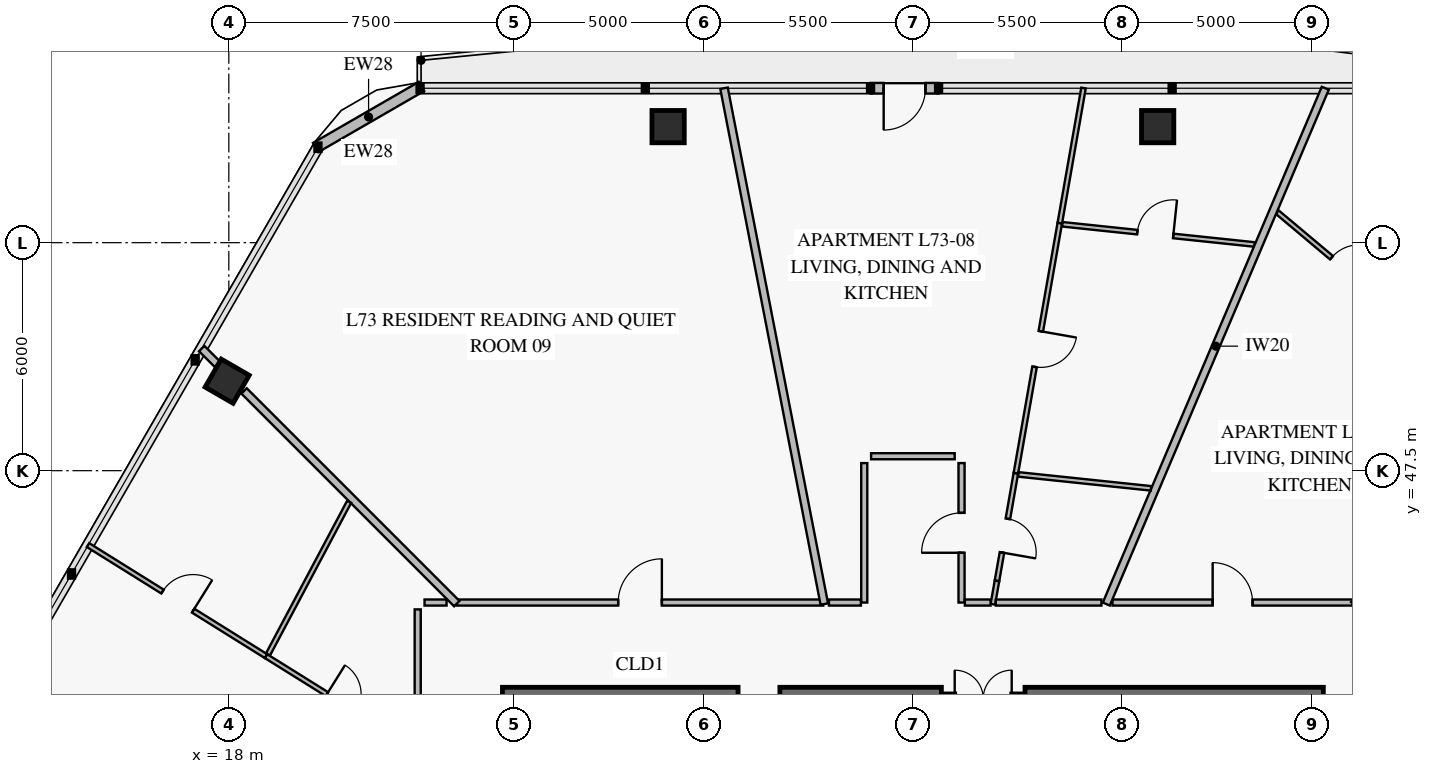
"""IFC4 building model, lengths in metres.
Left out: names, types, materials, properties, quantities, classifications, styles, units other than length and angle.
Written with IfcOpenShell. Run it as: python <this file> out.ifc"""

import sys

from ifc_helpers import new_model, si_unit, direction, frame, frame_2d, origin, origin_2d, place, context, subcontext, project, spatial, rectangle, extrude, element, fill, save


model = new_model("IFC4")
c1 = context("Model", 3, precision=1e-05, world=origin(), true_north=direction((0.0, 1.0)))
c2 = subcontext(c1, "Body", "Model", "MODEL_VIEW")
j1 = project(units=[si_unit("LENGTHUNIT", "METRE"), si_unit("PLANEANGLEUNIT", "RADIAN")], contexts=[c1])
p1 = place(None, origin())
s1 = spatial("IfcSite", under=j1, at=p1, CompositionType="ELEMENT")
p2 = place(p1, origin())
s2 = spatial("IfcBuilding", under=s1, at=p2, CompositionType="ELEMENT")
p3 = place(p2, frame((0.0, 0.0, 288.2)))
s3 = spatial("IfcBuildingStorey", under=s2, at=p3, CompositionType="ELEMENT", Elevation=288.2)
p4 = place(p3, frame((46.8, 41.5, 0.0), z_axis=(0.0, 0.0, 1.0), x_axis=(-1.0, 0.0, 0.0)))
e1 = element("IfcWall", 1, at=p4, inside=s3, PredefinedType="SHEAR", context=c2, shape_type="SweptSolid", body=[
    extrude(rectangle(XDim=7.85, YDim=0.6, at=frame_2d((3.925, 0.0))), origin(), (0.0, 0.0, 1.0), 3.8),
])
p5 = place(p3, frame((36.75, 41.5, 0.0), z_axis=(0.0, 0.0, 1.0), x_axis=(-1.0, 0.0, 0.0)))
e2 = element("IfcWall", 2, at=p5, inside=s3, PredefinedType="SHEAR", context=c2, shape_type="SweptSolid", body=[
    extrude(rectangle(XDim=11.55, YDim=0.6, at=frame_2d((5.775, 0.0))), origin(), (0.0, 0.0, 1.0), 3.8),
])
p6 = place(p5, frame((4.25, 0.0, 0.0)))
e3 = element("IfcOpeningElement", 3, at=p6, cuts=e2, PredefinedType="OPENING", context=c2, shape_type="SweptSolid", body=[
    extrude(rectangle(XDim=1.1, YDim=2.15, at=frame_2d((0.55, 1.075))), frame((0.0, 0.312, 0.0), z_axis=(0.0, -1.0, 0.0), x_axis=(1.0, 0.0, 0.0)), (0.0, 0.0, 1.0), 0.624),
])
for number, where, z_axis, x_axis in (
    (4, (42.441, 56.554, 0.0), (0.0, 0.0, 1.0), (-1.0, 0.0, 0.0)),
    (5, (29.559, 56.554, 0.0), (0.0, 0.0, 1.0), (-1.0, 0.0, 0.0)),
    (6, (17.956, 49.855, 0.0), (0.0, 0.0, 1.0), (-0.5, -0.866, 0.0)),
):
    element("IfcColumn", number, at=place(p3, frame(where, z_axis=z_axis, x_axis=x_axis)), inside=s3, PredefinedType="COLUMN", context=c2, shape_type="SweptSolid", body=[
        extrude(rectangle(XDim=0.85, YDim=0.85, at=origin_2d()), origin(), (0.0, 0.0, 1.0), 3.55),
    ])
p7 = place(p3, frame((20.285, 56.004, 0.0), z_axis=(0.0, 0.0, 1.0), x_axis=(0.866028773314, 0.499994163758, 0.0)))
e7 = element("IfcWall", 7, at=p7, inside=s3, PredefinedType="SOLIDWALL", context=c2, shape_type="SweptSolid", body=[
    extrude(rectangle(XDim=3.215, YDim=0.28, at=frame_2d((1.607, 0.0))), origin(), (0.0, 0.0, 1.0), 3.55),
])
p8 = place(p3, frame((34.886, 57.564, 0.0), z_axis=(0.0, 0.0, 1.0), x_axis=(1.0, 0.0, 0.0)))
e8 = element("IfcWall", 8, at=p8, inside=s3, PredefinedType="SOLIDWALL", context=c2, shape_type="SweptSolid", body=[
    extrude(rectangle(XDim=1.79, YDim=0.28, at=frame_2d((0.895, 0.0))), origin(), (0.0, 0.0, 1.0), 3.55),
])
p9 = place(p8, frame((0.345, 0.0, 0.0)))
e9 = element("IfcOpeningElement", 9, at=p9, cuts=e8, PredefinedType="OPENING", context=c2, shape_type="SweptSolid", body=[
    extrude(rectangle(XDim=1.1, YDim=2.2, at=frame_2d((0.55, 1.1))), frame((0.0, 0.152, 0.0), z_axis=(0.0, -1.0, 0.0), x_axis=(1.0, 0.0, 0.0)), (0.0, 0.0, 1.0), 0.304),
])
p10 = place(p3, frame((52.253, 48.71, 0.0), z_axis=(0.0, 0.0, 1.0), x_axis=(-0.766038651281, 0.642794512067, 0.0)))
e10 = element("IfcWall", 10, at=p10, inside=s3, PredefinedType="PARTITIONING", context=c2, shape_type="SweptSolid", body=[
    extrude(rectangle(XDim=8.7, YDim=0.12, at=frame_2d((4.35, 0.0))), origin(), (0.0, 0.0, 1.0), 3.55),
])
p11 = place(p10, frame((1.778, 0.0, 0.0)))
e11 = element("IfcOpeningElement", 11, at=p11, cuts=e10, PredefinedType="OPENING", context=c2, shape_type="SweptSolid", body=[
    extrude(rectangle(XDim=0.95, YDim=2.1, at=frame_2d((0.475, 1.05))), frame((0.0, 0.072, 0.0), z_axis=(0.0, -1.0, 0.0), x_axis=(1.0, 0.0, 0.0)), (0.0, 0.0, 1.0), 0.144),
])
p12 = place(p10, frame((5.887, 0.0, 0.0)))
e12 = element("IfcOpeningElement", 12, at=p12, cuts=e10, PredefinedType="OPENING", context=c2, shape_type="SweptSolid", body=[
    extrude(rectangle(XDim=0.95, YDim=2.1, at=frame_2d((0.475, 1.05))), frame((0.0, 0.072, 0.0), z_axis=(0.0, -1.0, 0.0), x_axis=(1.0, 0.0, 0.0)), (0.0, 0.0, 1.0), 0.144),
])
p13 = place(p3, frame((47.573, 44.03, 0.0), z_axis=(0.0, 0.0, 1.0), x_axis=(-1.0, 0.0, 0.0)))
e13 = element("IfcWall", 13, at=p13, inside=s3, PredefinedType="PARTITIONING", context=c2, shape_type="SweptSolid", body=[
    extrude(rectangle(XDim=6.321, YDim=0.16, at=frame_2d((3.16, 0.0))), origin(), (0.0, 0.0, 1.0), 3.55),
])
p14 = place(p13, frame((2.635, 0.0, 0.0)))
e14 = element("IfcOpeningElement", 14, at=p14, cuts=e13, PredefinedType="OPENING", context=c2, shape_type="SweptSolid", body=[
    extrude(rectangle(XDim=1.05, YDim=2.15, at=frame_2d((0.525, 1.075))), frame((0.0, 0.092, 0.0), z_axis=(0.0, -1.0, 0.0), x_axis=(1.0, 0.0, 0.0)), (0.0, 0.0, 1.0), 0.184),
])
p15 = place(p3, frame((38.213, 44.6, 0.0), z_axis=(0.0, 0.0, 1.0), x_axis=(0.172952580591, 0.984930152278, 0.0)))
e15 = element("IfcWall", 15, at=p15, inside=s3, PredefinedType="PARTITIONING", context=c2, shape_type="SweptSolid", body=[
    extrude(rectangle(XDim=2.877, YDim=0.12, at=frame_2d((1.438, 0.0))), origin(), (0.0, 0.0, 1.0), 3.55),
])
p16 = place(p15, frame((0.758, 0.0, 0.0)))
e16 = element("IfcOpeningElement", 16, at=p16, cuts=e15, PredefinedType="OPENING", context=c2, shape_type="SweptSolid", body=[
    extrude(rectangle(XDim=0.9, YDim=2.1, at=frame_2d((0.45, 1.05))), frame((0.0, 0.072, 0.0), z_axis=(0.0, -1.0, 0.0), x_axis=(1.0, 0.0, 0.0)), (0.0, 0.0, 1.0), 0.144),
])
p17 = place(p3, frame((38.71, 47.434, 0.0), z_axis=(0.0, 0.0, 1.0), x_axis=(0.172976678648, 0.984925920384, 0.0)))
e17 = element("IfcWall", 17, at=p17, inside=s3, PredefinedType="PARTITIONING", context=c2, shape_type="SweptSolid", body=[
    extrude(rectangle(XDim=6.683, YDim=0.12, at=frame_2d((3.342, 0.0))), origin(), (0.0, 0.0, 1.0), 3.15),
])
p18 = place(p17, frame((2.841, 0.0, 0.0)))
e18 = element("IfcOpeningElement", 18, at=p18, cuts=e17, PredefinedType="OPENING", context=c2, shape_type="SweptSolid", body=[
    extrude(rectangle(XDim=0.95, YDim=2.1, at=frame_2d((0.475, 1.05))), frame((0.0, 0.072, 0.0), z_axis=(0.0, -1.0, 0.0), x_axis=(1.0, 0.0, 0.0)), (0.0, 0.0, 1.0), 0.144),
])
p19 = place(p3, frame((44.994, 53.452, 0.0), z_axis=(0.0, 0.0, 1.0), x_axis=(-0.994522778287, 0.104520062511, 0.0)))
e19 = element("IfcWall", 19, at=p19, inside=s3, PredefinedType="PARTITIONING", context=c2, shape_type="SweptSolid", body=[
    extrude(rectangle(XDim=5.092, YDim=0.12, at=frame_2d((2.546, 0.0))), origin(), (0.0, 0.0, 1.0), 2.95),
])
p20 = place(p19, frame((2.155, 0.0, 0.0)))
e20 = element("IfcOpeningElement", 20, at=p20, cuts=e19, PredefinedType="OPENING", context=c2, shape_type="SweptSolid", body=[
    extrude(rectangle(XDim=0.95, YDim=2.1, at=frame_2d((0.475, 1.05))), frame((0.0, 0.072, 0.0), z_axis=(0.0, -1.0, 0.0), x_axis=(1.0, 0.0, 0.0)), (0.0, 0.0, 1.0), 0.144),
])
p21 = place(p3, frame((37.28, 44.03, 0.0), z_axis=(0.0, 0.0, 1.0), x_axis=(0.0, 1.0, 0.0)))
e21 = element("IfcWall", 21, at=p21, inside=s3, PredefinedType="PARTITIONING", context=c2, shape_type="SweptSolid", body=[
    extrude(rectangle(XDim=3.67, YDim=0.16, at=frame_2d((1.835, 0.0))), origin(), (0.0, 0.0, 1.0), 3.55),
])
p22 = place(p21, frame((1.31, 0.0, 0.0)))
e22 = element("IfcOpeningElement", 22, at=p22, cuts=e21, PredefinedType="OPENING", context=c2, shape_type="SweptSolid", body=[
    extrude(rectangle(XDim=1.05, YDim=2.15, at=frame_2d((0.525, 1.075))), frame((0.0, 0.092, 0.0), z_axis=(0.0, -1.0, 0.0), x_axis=(1.0, 0.0, 0.0)), (0.0, 0.0, 1.0), 0.184),
])
p23 = place(p3, frame((33.641, 44.03, 0.0), z_axis=(0.0, 0.0, 1.0), x_axis=(-1.0, 0.0, 0.0)))
e23 = element("IfcWall", 23, at=p23, inside=s3, PredefinedType="PARTITIONING", context=c2, shape_type="SweptSolid", body=[
    extrude(rectangle(XDim=9.643, YDim=0.16, at=frame_2d((4.821, 0.0))), origin(), (0.0, 0.0, 1.0), 2.95),
])
p24 = place(p23, frame((4.246, 0.0, 0.0)))
e24 = element("IfcOpeningElement", 24, at=p24, cuts=e23, PredefinedType="OPENING", context=c2, shape_type="SweptSolid", body=[
    extrude(rectangle(XDim=1.15, YDim=2.2, at=frame_2d((0.575, 1.1))), frame((0.0, 0.092, 0.0), z_axis=(0.0, -1.0, 0.0), x_axis=(1.0, 0.0, 0.0)), (0.0, 0.0, 1.0), 0.184),
])
p25 = place(p3, frame((22.4, 40.485, 0.0), z_axis=(0.0, 0.0, 1.0), x_axis=(-0.848426577967, 0.529313084856, 0.0)))
e25 = element("IfcWall", 25, at=p25, inside=s3, PredefinedType="PARTITIONING", context=c2, shape_type="SweptSolid", body=[
    extrude(rectangle(XDim=4.033, YDim=0.12, at=frame_2d((2.016, 0.0))), origin(), (0.0, 0.0, 1.0), 3.15),
])
p26 = place(p25, frame((1.244, 0.0, 0.0)))
e26 = element("IfcOpeningElement", 26, at=p26, cuts=e25, PredefinedType="OPENING", context=c2, shape_type="SweptSolid", body=[
    extrude(rectangle(XDim=0.9, YDim=2.1, at=frame_2d((0.45, 1.05))), frame((0.0, 0.072, 0.0), z_axis=(0.0, -1.0, 0.0), x_axis=(1.0, 0.0, 0.0)), (0.0, 0.0, 1.0), 0.144),
])
p27 = place(p3, frame((18.979, 42.62, 0.0), z_axis=(0.0, 0.0, 1.0), x_axis=(-0.848420368306, 0.529323038081, 0.0)))
e27 = element("IfcWall", 27, at=p27, inside=s3, PredefinedType="PARTITIONING", context=c2, shape_type="SweptSolid", body=[
    extrude(rectangle(XDim=5.521, YDim=0.12, at=frame_2d((2.76, 0.0))), origin(), (0.0, 0.0, 1.0), 2.93),
])
p28 = place(p27, frame((2.26, 0.0, 0.0)))
e28 = element("IfcOpeningElement", 28, at=p28, cuts=e27, PredefinedType="OPENING", context=c2, shape_type="SweptSolid", body=[
    extrude(rectangle(XDim=0.95, YDim=2.1, at=frame_2d((0.475, 1.05))), frame((0.0, 0.072, 0.0), z_axis=(0.0, -1.0, 0.0), x_axis=(1.0, 0.0, 0.0)), (0.0, 0.0, 1.0), 0.144),
])
p29 = place(p3, frame((47.573, 44.001, 0.0), z_axis=(0.0, 0.0, 1.0), x_axis=(0.69407582512, 0.719901902334, 0.0)))
e29 = element("IfcWall", 29, at=p29, inside=s3, PredefinedType="PARTITIONING", context=c2, shape_type="SweptSolid", body=[
    extrude(rectangle(XDim=0.832, YDim=0.12, at=frame_2d((0.416, 0.0))), origin(), (0.0, 0.0, 1.0), 3.55),
])
p30 = place(p3, frame((41.09, 43.99, 0.0), z_axis=(0.0, 0.0, 1.0), x_axis=(0.390717789384, 0.920510515453, 0.0)))
e30 = element("IfcWall", 30, at=p30, inside=s3, PredefinedType="PARTITIONING", context=c2, shape_type="SweptSolid", body=[
    extrude(rectangle(XDim=14.746, YDim=0.2, at=frame_2d((7.373, 0.0))), origin(), (0.0, 0.0, 1.0), 2.93),
])
p31 = place(p3, frame((38.105, 43.985, 0.0), z_axis=(0.0, 0.0, 1.0), x_axis=(0.172892682852, 0.984940668374, 0.0)))
e31 = element("IfcWall", 31, at=p31, inside=s3, PredefinedType="PARTITIONING", context=c2, shape_type="SweptSolid", body=[
    extrude(rectangle(XDim=0.624, YDim=0.12, at=frame_2d((0.312, 0.0))), origin(), (0.0, 0.0, 1.0), 3.55),
])
p32 = place(p3, frame((39.866, 54.016, 0.0), z_axis=(0.0, 0.0, 1.0), x_axis=(0.172931953875, 0.984933774083, 0.0)))
e32 = element("IfcWall", 32, at=p32, inside=s3, PredefinedType="PARTITIONING", context=c2, shape_type="SweptSolid", body=[
    extrude(rectangle(XDim=3.607, YDim=0.12, at=frame_2d((1.804, 0.0))), origin(), (0.0, 0.0, 1.0), 2.93),
])
p33 = place(p3, frame((42.265, 47.035, 0.0), z_axis=(0.0, 0.0, 1.0), x_axis=(-0.994521067177, 0.104536342679, 0.0)))
e33 = element("IfcWall", 33, at=p33, inside=s3, PredefinedType="PARTITIONING", context=c2, shape_type="SweptSolid", body=[
    extrude(rectangle(XDim=3.51, YDim=0.12, at=frame_2d((1.755, 0.0))), origin(), (0.0, 0.0, 1.0), 2.95),
])
p34 = place(p3, frame((33.669, 43.99, 0.0), z_axis=(0.0, 0.0, 1.0), x_axis=(-0.190806334077, 0.981627700748, 0.0)))
e34 = element("IfcWall", 34, at=p34, inside=s3, PredefinedType="PARTITIONING", context=c2, shape_type="SweptSolid", body=[
    extrude(rectangle(XDim=13.828, YDim=0.2, at=frame_2d((6.914, 0.0))), origin(), (0.0, 0.0, 1.0), 2.93),
])
p35 = place(p3, frame((23.998, 44.002, 0.0), z_axis=(0.0, 0.0, 1.0), x_axis=(-0.707106781187, 0.707106781187, 0.0)))
e35 = element("IfcWall", 35, at=p35, inside=s3, PredefinedType="PARTITIONING", context=c2, shape_type="SweptSolid", body=[
    extrude(rectangle(XDim=7.915, YDim=0.2, at=frame_2d((3.958, 0.0))), origin(), (0.0, 0.0, 1.0), 2.95),
])
p36 = place(p3, frame((17.7, 50.3, 0.0), z_axis=(0.0, 0.0, 1.0), x_axis=(-0.707106781187, 0.707106781187, 0.0)))
e36 = element("IfcWall", 36, at=p36, inside=s3, PredefinedType="PARTITIONING", context=c2, shape_type="SweptSolid", body=[
    extrude(rectangle(XDim=0.586, YDim=0.2, at=frame_2d((0.293, 0.0))), origin(), (0.0, 0.0, 1.0), 3.122),
])
p37 = place(p3, frame((21.166, 46.681, 0.0), z_axis=(0.0, 0.0, 1.0), x_axis=(-0.469475824994, -0.88294532659, 0.0)))
e37 = element("IfcWall", 37, at=p37, inside=s3, PredefinedType="PARTITIONING", context=c2, shape_type="SweptSolid", body=[
    extrude(rectangle(XDim=4.547, YDim=0.12, at=frame_2d((2.273, 0.0))), origin(), (0.0, 0.0, 1.0), 2.95),
])
p38 = place(p3, frame((34.72, 47.7, 0.0), z_axis=(0.0, 0.0, 1.0), x_axis=(0.0, -1.0, 0.0)))
e38 = element("IfcWall", 38, at=p38, inside=s3, PredefinedType="PARTITIONING", context=c2, shape_type="SweptSolid", body=[
    extrude(rectangle(XDim=3.67, YDim=0.16, at=frame_2d((1.835, 0.0))), origin(), (0.0, 0.0, 1.0), 3.55),
])
p39 = place(p3, frame((37.1, 47.88, 0.0), z_axis=(0.0, 0.0, 1.0), x_axis=(-1.0, 0.0, 0.0)))
e39 = element("IfcWall", 39, at=p39, inside=s3, PredefinedType="PARTITIONING", context=c2, shape_type="SweptSolid", body=[
    extrude(rectangle(XDim=2.2, YDim=0.16, at=frame_2d((1.1, 0.0))), origin(), (0.0, 0.0, 1.0), 3.55),
])
p40 = place(p3, frame((34.632, 44.03, 0.0), z_axis=(0.0, 0.0, 1.0), x_axis=(-1.0, 0.0, 0.0)))
e40 = element("IfcWall", 40, at=p40, inside=s3, PredefinedType="PARTITIONING", context=c2, shape_type="SweptSolid", body=[
    extrude(rectangle(XDim=0.841, YDim=0.16, at=frame_2d((0.421, 0.0))), origin(), (0.0, 0.0, 1.0), 3.55),
])
p41 = place(p3, frame((38.043, 44.03, 0.0), z_axis=(0.0, 0.0, 1.0), x_axis=(-1.0, 0.0, 0.0)))
e41 = element("IfcWall", 41, at=p41, inside=s3, PredefinedType="PARTITIONING", context=c2, shape_type="SweptSolid", body=[
    extrude(rectangle(XDim=0.676, YDim=0.16, at=frame_2d((0.338, 0.0))), origin(), (0.0, 0.0, 1.0), 3.55),
])
p42 = place(p3, frame((40.961, 44.03, 0.0), z_axis=(0.0, 0.0, 1.0), x_axis=(-1.0, 0.0, 0.0)))
e42 = element("IfcWall", 42, at=p42, inside=s3, PredefinedType="PARTITIONING", context=c2, shape_type="SweptSolid", body=[
    extrude(rectangle(XDim=2.78, YDim=0.16, at=frame_2d((1.39, 0.0))), origin(), (0.0, 0.0, 1.0), 2.95),
])
p43 = place(p3, frame((22.97, 43.85, 0.0), z_axis=(0.0, 0.0, 1.0), x_axis=(0.0, -1.0, 0.0)))
e43 = element("IfcWall", 43, at=p43, inside=s3, PredefinedType="PARTITIONING", context=c2, shape_type="SweptSolid", body=[
    extrude(rectangle(XDim=3.641, YDim=0.16, at=frame_2d((1.82, 0.0))), origin(), (0.0, 0.0, 1.0), 3.55),
])
p44 = place(p3, frame((23.729, 44.03, 0.0), z_axis=(0.0, 0.0, 1.0), x_axis=(-1.0, 0.0, 0.0)))
e44 = element("IfcWall", 44, at=p44, inside=s3, PredefinedType="PARTITIONING", context=c2, shape_type="SweptSolid", body=[
    extrude(rectangle(XDim=0.58, YDim=0.16, at=frame_2d((0.29, 0.0))), origin(), (0.0, 0.0, 1.0), 2.95),
])
p45 = place(p9, frame((1.1, 0.0, 0.0), z_axis=(0.0, 0.0, 1.0), x_axis=(-1.0, 0.0, 0.0)))
e45 = element("IfcDoor", 45, at=p45, inside=s3, OperationType="SINGLE_SWING_RIGHT", PredefinedType="DOOR", context=c2, shape_type="SweptSolid", body=[
    extrude(rectangle(XDim=1.1, YDim=2.2, at=frame_2d((0.55, 1.1))), frame((0.0, 0.025, 0.0), z_axis=(0.0, -1.0, 0.0), x_axis=(1.0, 0.0, 0.0)), (0.0, 0.0, 1.0), 0.05),
])
fill(e9, e45)
p46 = place(p12, frame((0.95, 0.0, 0.0), z_axis=(0.0, 0.0, 1.0), x_axis=(-1.0, 0.0, 0.0)))
e46 = element("IfcDoor", 46, at=p46, inside=s3, OperationType="SINGLE_SWING_RIGHT", PredefinedType="DOOR", context=c2, shape_type="SweptSolid", body=[
    extrude(rectangle(XDim=0.95, YDim=2.1, at=frame_2d((0.475, 1.05))), frame((0.0, 0.025, 0.0), z_axis=(0.0, -1.0, 0.0), x_axis=(1.0, 0.0, 0.0)), (0.0, 0.0, 1.0), 0.05),
])
fill(e12, e46)
p47 = place(p14, frame((1.05, 0.0, 0.0), z_axis=(0.0, 0.0, 1.0), x_axis=(-1.0, 0.0, 0.0)))
e47 = element("IfcDoor", 47, at=p47, inside=s3, OperationType="SINGLE_SWING_LEFT", PredefinedType="DOOR", context=c2, shape_type="SweptSolid", body=[
    extrude(rectangle(XDim=1.05, YDim=2.15, at=frame_2d((0.525, 1.075))), frame((0.0, 0.025, 0.0), z_axis=(0.0, -1.0, 0.0), x_axis=(1.0, 0.0, 0.0)), (0.0, 0.0, 1.0), 0.05),
])
fill(e14, e47)
p48 = place(p16, frame((0.9, 0.0, 0.0), z_axis=(0.0, 0.0, 1.0), x_axis=(-1.0, 0.0, 0.0)))
e48 = element("IfcDoor", 48, at=p48, inside=s3, OperationType="SINGLE_SWING_RIGHT", PredefinedType="DOOR", context=c2, shape_type="SweptSolid", body=[
    extrude(rectangle(XDim=0.9, YDim=2.1, at=frame_2d((0.45, 1.05))), frame((0.0, 0.025, 0.0), z_axis=(0.0, -1.0, 0.0), x_axis=(1.0, 0.0, 0.0)), (0.0, 0.0, 1.0), 0.05),
])
fill(e16, e48)
p49 = place(p18, frame((0.95, 0.0, 0.0), z_axis=(0.0, 0.0, 1.0), x_axis=(-1.0, 0.0, 0.0)))
e49 = element("IfcDoor", 49, at=p49, inside=s3, OperationType="SINGLE_SWING_LEFT", PredefinedType="DOOR", context=c2, shape_type="SweptSolid", body=[
    extrude(rectangle(XDim=0.95, YDim=2.1, at=frame_2d((0.475, 1.05))), frame((0.0, 0.025, 0.0), z_axis=(0.0, -1.0, 0.0), x_axis=(1.0, 0.0, 0.0)), (0.0, 0.0, 1.0), 0.05),
])
fill(e18, e49)
p50 = place(p20, frame((0.95, 0.0, 0.0), z_axis=(0.0, 0.0, 1.0), x_axis=(-1.0, 0.0, 0.0)))
e50 = element("IfcDoor", 50, at=p50, inside=s3, OperationType="SINGLE_SWING_RIGHT", PredefinedType="DOOR", context=c2, shape_type="SweptSolid", body=[
    extrude(rectangle(XDim=0.95, YDim=2.1, at=frame_2d((0.475, 1.05))), frame((0.0, 0.025, 0.0), z_axis=(0.0, -1.0, 0.0), x_axis=(1.0, 0.0, 0.0)), (0.0, 0.0, 1.0), 0.05),
])
fill(e20, e50)
p51 = place(p22, origin())
e51 = element("IfcDoor", 51, at=p51, inside=s3, OperationType="SINGLE_SWING_LEFT", PredefinedType="DOOR", context=c2, shape_type="SweptSolid", body=[
    extrude(rectangle(XDim=1.05, YDim=2.15, at=frame_2d((0.525, 1.075))), frame((0.0, 0.025, 0.0), z_axis=(0.0, -1.0, 0.0), x_axis=(1.0, 0.0, 0.0)), (0.0, 0.0, 1.0), 0.05),
])
fill(e22, e51)
p52 = place(p24, frame((1.15, 0.0, 0.0), z_axis=(0.0, 0.0, 1.0), x_axis=(-1.0, 0.0, 0.0)))
e52 = element("IfcDoor", 52, at=p52, inside=s3, OperationType="SINGLE_SWING_RIGHT", PredefinedType="DOOR", context=c2, shape_type="SweptSolid", body=[
    extrude(rectangle(XDim=1.15, YDim=2.2, at=frame_2d((0.575, 1.1))), frame((0.0, 0.025, 0.0), z_axis=(0.0, -1.0, 0.0), x_axis=(1.0, 0.0, 0.0)), (0.0, 0.0, 1.0), 0.05),
])
fill(e24, e52)
p53 = place(p26, frame((0.9, 0.0, 0.0), z_axis=(0.0, 0.0, 1.0), x_axis=(-1.0, 0.0, 0.0)))
e53 = element("IfcDoor", 53, at=p53, inside=s3, OperationType="SINGLE_SWING_LEFT", PredefinedType="DOOR", context=c2, shape_type="SweptSolid", body=[
    extrude(rectangle(XDim=0.9, YDim=2.1, at=frame_2d((0.45, 1.05))), frame((0.0, 0.025, 0.0), z_axis=(0.0, -1.0, 0.0), x_axis=(1.0, 0.0, 0.0)), (0.0, 0.0, 1.0), 0.05),
])
fill(e26, e53)
p54 = place(p28, frame((0.95, 0.0, 0.0), z_axis=(0.0, 0.0, 1.0), x_axis=(-1.0, 0.0, 0.0)))
e54 = element("IfcDoor", 54, at=p54, inside=s3, OperationType="SINGLE_SWING_RIGHT", PredefinedType="DOOR", context=c2, shape_type="SweptSolid", body=[
    extrude(rectangle(XDim=0.95, YDim=2.1, at=frame_2d((0.475, 1.05))), frame((0.0, 0.025, 0.0), z_axis=(0.0, -1.0, 0.0), x_axis=(1.0, 0.0, 0.0)), (0.0, 0.0, 1.0), 0.05),
])
fill(e28, e54)
save(model, sys.argv[1])
